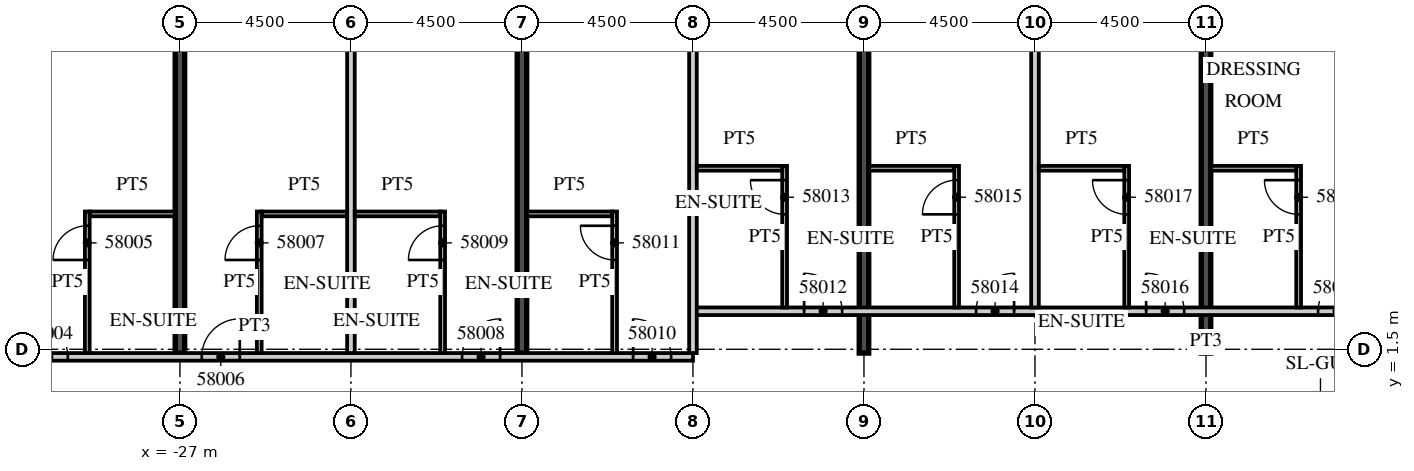
"""IFC4 building model, lengths in metres.
Left out: names, types, materials, properties, quantities, classifications, styles, units other than length and angle.
Written with IfcOpenShell. Run it as: python <this file> out.ifc"""

import sys

from ifc_helpers import new_model, si_unit, direction, frame, frame_2d, origin, place, context, subcontext, project, spatial, rectangle, extrude, element, fill, save


model = new_model("IFC4")
c1 = context("Model", 3, precision=1e-05, world=origin(), true_north=direction((0.0, 1.0)))
c2 = subcontext(c1, "Body", "Model", "MODEL_VIEW")
j1 = project(units=[si_unit("LENGTHUNIT", "METRE"), si_unit("PLANEANGLEUNIT", "RADIAN")], contexts=[c1])
p1 = place(None, origin())
s1 = spatial("IfcSite", under=j1, at=p1, CompositionType="ELEMENT")
p2 = place(p1, origin())
s2 = spatial("IfcBuilding", under=s1, at=p2, CompositionType="ELEMENT")
p3 = place(p2, frame((0.0, 0.0, 237.5)))
s3 = spatial("IfcBuildingStorey", under=s2, at=p3, CompositionType="ELEMENT", Elevation=237.5)
p4 = place(p3, frame((-27.0, 1.4, 0.0), z_axis=(0.0, 0.0, 1.0), x_axis=(0.0, 1.0, 0.0)))
e1 = element("IfcWall", 1, at=p4, inside=s3, PredefinedType="SHEAR", context=c2, shape_type="SweptSolid", body=[
    extrude(rectangle(XDim=18.817, YDim=0.25, at=frame_2d((9.409, 0.0))), origin(), (0.0, 0.0, 1.0), 3.3),
])
p5 = place(p3, frame((-18.0, 1.4, 0.0), z_axis=(0.0, 0.0, 1.0), x_axis=(0.0, 1.0, 0.0)))
e2 = element("IfcWall", 2, at=p5, inside=s3, PredefinedType="SHEAR", context=c2, shape_type="SweptSolid", body=[
    extrude(rectangle(XDim=18.974, YDim=0.25, at=frame_2d((9.487, 0.0))), origin(), (0.0, 0.0, 1.0), 3.3),
])
p6 = place(p3, frame((-9.0, 1.4, 0.0), z_axis=(0.0, 0.0, 1.0), x_axis=(0.0, 1.0, 0.0)))
e3 = element("IfcWall", 3, at=p6, inside=s3, PredefinedType="SHEAR", context=c2, shape_type="SweptSolid", body=[
    extrude(rectangle(XDim=19.132, YDim=0.25, at=frame_2d((9.566, 0.0))), origin(), (0.0, 0.0, 1.0), 3.3),
])
p7 = place(p3, frame((0.0, 1.4, 0.0), z_axis=(0.0, 0.0, 1.0), x_axis=(0.0, 1.0, 0.0)))
e4 = element("IfcWall", 4, at=p7, inside=s3, PredefinedType="SHEAR", context=c2, shape_type="SweptSolid", body=[
    extrude(rectangle(XDim=19.289, YDim=0.25, at=frame_2d((9.644, 0.0))), origin(), (0.0, 0.0, 1.0), 3.3),
])
p8 = place(p3, frame((-36.566, 1.3, 0.0), z_axis=(0.0, 0.0, 1.0), x_axis=(1.0, 0.0, 0.0)))
e5 = element("IfcWall", 5, at=p8, inside=s3, PredefinedType="PARTITIONING", context=c2, shape_type="SweptSolid", body=[
    extrude(rectangle(XDim=23.066, YDim=0.2, at=frame_2d((11.533, 0.0))), origin(), (0.0, 0.0, 1.0), 3.02),
])
p9 = place(p8, frame((1.141, 0.0, 0.0)))
e6 = element("IfcOpeningElement", 6, at=p9, cuts=e5, PredefinedType="OPENING", context=c2, shape_type="SweptSolid", body=[
    extrude(rectangle(XDim=1.0, YDim=2.1, at=frame_2d((0.5, 1.05))), frame((0.0, 0.11, 0.0), z_axis=(0.0, -1.0, 0.0), x_axis=(1.0, 0.0, 0.0)), (0.0, 0.0, 1.0), 0.22),
])
p10 = place(p8, frame((5.616, 0.0, 0.0)))
e7 = element("IfcOpeningElement", 7, at=p10, cuts=e5, PredefinedType="OPENING", context=c2, shape_type="SweptSolid", body=[
    extrude(rectangle(XDim=1.0, YDim=2.1, at=frame_2d((0.5, 1.05))), frame((0.0, 0.11, 0.0), z_axis=(0.0, -1.0, 0.0), x_axis=(1.0, 0.0, 0.0)), (0.0, 0.0, 1.0), 0.22),
])
p11 = place(p8, frame((10.141, 0.0, 0.0)))
e8 = element("IfcOpeningElement", 8, at=p11, cuts=e5, PredefinedType="OPENING", context=c2, shape_type="SweptSolid", body=[
    extrude(rectangle(XDim=1.0, YDim=2.1, at=frame_2d((0.5, 1.05))), frame((0.0, 0.11, 0.0), z_axis=(0.0, -1.0, 0.0), x_axis=(1.0, 0.0, 0.0)), (0.0, 0.0, 1.0), 0.22),
])
p12 = place(p8, frame((16.991, 0.0, 0.0)))
e9 = element("IfcOpeningElement", 9, at=p12, cuts=e5, PredefinedType="OPENING", context=c2, shape_type="SweptSolid", body=[
    extrude(rectangle(XDim=1.0, YDim=2.1, at=frame_2d((0.5, 1.05))), frame((0.0, 0.11, 0.0), z_axis=(0.0, -1.0, 0.0), x_axis=(1.0, 0.0, 0.0)), (0.0, 0.0, 1.0), 0.22),
])
p13 = place(p8, frame((21.491, 0.0, 0.0)))
e10 = element("IfcOpeningElement", 10, at=p13, cuts=e5, PredefinedType="OPENING", context=c2, shape_type="SweptSolid", body=[
    extrude(rectangle(XDim=1.0, YDim=2.1, at=frame_2d((0.5, 1.05))), frame((0.0, 0.11, 0.0), z_axis=(0.0, -1.0, 0.0), x_axis=(1.0, 0.0, 0.0)), (0.0, 0.0, 1.0), 0.22),
])
p14 = place(p3, frame((-13.5, 2.5, 0.0), z_axis=(0.0, 0.0, 1.0), x_axis=(1.0, 0.0, 0.0)))
e11 = element("IfcWall", 11, at=p14, inside=s3, PredefinedType="PARTITIONING", context=c2, shape_type="SweptSolid", body=[
    extrude(rectangle(XDim=27.0, YDim=0.2, at=frame_2d((13.5, 0.0))), origin(), (0.0, 0.0, 1.0), 3.02),
])
p15 = place(p14, frame((2.925, 0.0, 0.0)))
e12 = element("IfcOpeningElement", 12, at=p15, cuts=e11, PredefinedType="OPENING", context=c2, shape_type="SweptSolid", body=[
    extrude(rectangle(XDim=1.0, YDim=2.1, at=frame_2d((0.5, 1.05))), frame((0.0, 0.11, 0.0), z_axis=(0.0, -1.0, 0.0), x_axis=(1.0, 0.0, 0.0)), (0.0, 0.0, 1.0), 0.22),
])
p16 = place(p14, frame((7.45, 0.0, 0.0)))
e13 = element("IfcOpeningElement", 13, at=p16, cuts=e11, PredefinedType="OPENING", context=c2, shape_type="SweptSolid", body=[
    extrude(rectangle(XDim=1.0, YDim=2.1, at=frame_2d((0.5, 1.05))), frame((0.0, 0.11, 0.0), z_axis=(0.0, -1.0, 0.0), x_axis=(1.0, 0.0, 0.0)), (0.0, 0.0, 1.0), 0.22),
])
p17 = place(p14, frame((11.925, 0.0, 0.0)))
e14 = element("IfcOpeningElement", 14, at=p17, cuts=e11, PredefinedType="OPENING", context=c2, shape_type="SweptSolid", body=[
    extrude(rectangle(XDim=1.0, YDim=2.1, at=frame_2d((0.5, 1.05))), frame((0.0, 0.11, 0.0), z_axis=(0.0, -1.0, 0.0), x_axis=(1.0, 0.0, 0.0)), (0.0, 0.0, 1.0), 0.22),
])
p18 = place(p14, frame((16.45, 0.0, 0.0)))
e15 = element("IfcOpeningElement", 15, at=p18, cuts=e11, PredefinedType="OPENING", context=c2, shape_type="SweptSolid", body=[
    extrude(rectangle(XDim=1.0, YDim=2.1, at=frame_2d((0.5, 1.05))), frame((0.0, 0.11, 0.0), z_axis=(0.0, -1.0, 0.0), x_axis=(1.0, 0.0, 0.0)), (0.0, 0.0, 1.0), 0.22),
])
p19 = place(p14, frame((18.55, 0.0, 0.0)))
e16 = element("IfcOpeningElement", 16, at=p19, cuts=e11, PredefinedType="OPENING", context=c2, shape_type="SweptSolid", body=[
    extrude(rectangle(XDim=1.0, YDim=2.1, at=frame_2d((0.5, 1.05))), frame((0.0, 0.11, 0.0), z_axis=(0.0, -1.0, 0.0), x_axis=(1.0, 0.0, 0.0)), (0.0, 0.0, 1.0), 0.22),
])
p20 = place(p14, frame((23.075, 0.0, 0.0)))
e17 = element("IfcOpeningElement", 17, at=p20, cuts=e11, PredefinedType="OPENING", context=c2, shape_type="SweptSolid", body=[
    extrude(rectangle(XDim=1.0, YDim=2.1, at=frame_2d((0.5, 1.05))), frame((0.0, 0.11, 0.0), z_axis=(0.0, -1.0, 0.0), x_axis=(1.0, 0.0, 0.0)), (0.0, 0.0, 1.0), 0.22),
])
p21 = place(p3, frame((-29.438, 1.4, 0.0), z_axis=(0.0, 0.0, 1.0), x_axis=(0.0, 1.0, 0.0)))
e18 = element("IfcWall", 18, at=p21, inside=s3, PredefinedType="PARTITIONING", context=c2, shape_type="SweptSolid", body=[
    extrude(rectangle(XDim=3.725, YDim=0.125, at=frame_2d((1.863, 0.0))), origin(), (0.0, 0.0, 1.0), 3.02),
])
p22 = place(p21, frame((2.45, 0.0, 0.0)))
e19 = element("IfcOpeningElement", 19, at=p22, cuts=e18, PredefinedType="OPENING", context=c2, shape_type="SweptSolid", body=[
    extrude(rectangle(XDim=0.9, YDim=2.1, at=frame_2d((0.45, 1.05))), frame((0.0, 0.073, 0.0), z_axis=(0.0, -1.0, 0.0), x_axis=(1.0, 0.0, 0.0)), (0.0, 0.0, 1.0), 0.145),
])
p23 = place(p3, frame((-29.375, 5.062, 0.0), z_axis=(0.0, 0.0, 1.0), x_axis=(1.0, 0.0, 0.0)))
e20 = element("IfcWall", 20, at=p23, inside=s3, PredefinedType="PARTITIONING", context=c2, shape_type="SweptSolid", body=[
    extrude(rectangle(XDim=2.25, YDim=0.125, at=frame_2d((1.125, 0.0))), origin(), (0.0, 0.0, 1.0), 3.02),
])
p24 = place(p3, frame((-22.5, 1.4, 0.0), z_axis=(0.0, 0.0, 1.0), x_axis=(0.0, 1.0, 0.0)))
e21 = element("IfcWall", 21, at=p24, inside=s3, PredefinedType="PARTITIONING", context=c2, shape_type="SweptSolid", body=[
    extrude(rectangle(XDim=18.908, YDim=0.2, at=frame_2d((9.454, 0.0))), origin(), (0.0, 0.0, 1.0), 3.02),
])
p25 = place(p3, frame((-24.913, 1.4, 0.0), z_axis=(0.0, 0.0, 1.0), x_axis=(0.0, 1.0, 0.0)))
e22 = element("IfcWall", 22, at=p25, inside=s3, PredefinedType="PARTITIONING", context=c2, shape_type="SweptSolid", body=[
    extrude(rectangle(XDim=3.725, YDim=0.125, at=frame_2d((1.863, 0.0))), origin(), (0.0, 0.0, 1.0), 3.02),
])
p26 = place(p25, frame((2.45, 0.0, 0.0)))
e23 = element("IfcOpeningElement", 23, at=p26, cuts=e22, PredefinedType="OPENING", context=c2, shape_type="SweptSolid", body=[
    extrude(rectangle(XDim=0.9, YDim=2.1, at=frame_2d((0.45, 1.05))), frame((0.0, 0.073, 0.0), z_axis=(0.0, -1.0, 0.0), x_axis=(1.0, 0.0, 0.0)), (0.0, 0.0, 1.0), 0.145),
])
p27 = place(p3, frame((-24.85, 5.062, 0.0), z_axis=(0.0, 0.0, 1.0), x_axis=(1.0, 0.0, 0.0)))
e24 = element("IfcWall", 24, at=p27, inside=s3, PredefinedType="PARTITIONING", context=c2, shape_type="SweptSolid", body=[
    extrude(rectangle(XDim=2.25, YDim=0.125, at=frame_2d((1.125, 0.0))), origin(), (0.0, 0.0, 1.0), 3.02),
])
p28 = place(p3, frame((-20.087, 1.4, 0.0), z_axis=(0.0, 0.0, 1.0), x_axis=(0.0, 1.0, 0.0)))
e25 = element("IfcWall", 25, at=p28, inside=s3, PredefinedType="PARTITIONING", context=c2, shape_type="SweptSolid", body=[
    extrude(rectangle(XDim=3.725, YDim=0.125, at=frame_2d((1.863, 0.0))), origin(), (0.0, 0.0, 1.0), 3.02),
])
p29 = place(p28, frame((2.45, 0.0, 0.0)))
e26 = element("IfcOpeningElement", 26, at=p29, cuts=e25, PredefinedType="OPENING", context=c2, shape_type="SweptSolid", body=[
    extrude(rectangle(XDim=0.9, YDim=2.1, at=frame_2d((0.45, 1.05))), frame((0.0, 0.073, 0.0), z_axis=(0.0, -1.0, 0.0), x_axis=(1.0, 0.0, 0.0)), (0.0, 0.0, 1.0), 0.145),
])
p30 = place(p3, frame((-22.4, 5.062, 0.0), z_axis=(0.0, 0.0, 1.0), x_axis=(1.0, 0.0, 0.0)))
e27 = element("IfcWall", 27, at=p30, inside=s3, PredefinedType="PARTITIONING", context=c2, shape_type="SweptSolid", body=[
    extrude(rectangle(XDim=2.25, YDim=0.125, at=frame_2d((1.125, 0.0))), origin(), (0.0, 0.0, 1.0), 3.02),
])
p31 = place(p3, frame((-13.5, 1.4, 0.0), z_axis=(0.0, 0.0, 1.0), x_axis=(0.0, 1.0, 0.0)))
e28 = element("IfcWall", 28, at=p31, inside=s3, PredefinedType="PARTITIONING", context=c2, shape_type="SweptSolid", body=[
    extrude(rectangle(XDim=19.065, YDim=0.2, at=frame_2d((9.533, 0.0))), origin(), (0.0, 0.0, 1.0), 3.02),
])
p32 = place(p3, frame((-15.562, 1.4, 0.0), z_axis=(0.0, 0.0, 1.0), x_axis=(0.0, 1.0, 0.0)))
e29 = element("IfcWall", 29, at=p32, inside=s3, PredefinedType="PARTITIONING", context=c2, shape_type="SweptSolid", body=[
    extrude(rectangle(XDim=3.725, YDim=0.125, at=frame_2d((1.863, 0.0))), origin(), (0.0, 0.0, 1.0), 3.02),
])
p33 = place(p32, frame((2.45, 0.0, 0.0)))
e30 = element("IfcOpeningElement", 30, at=p33, cuts=e29, PredefinedType="OPENING", context=c2, shape_type="SweptSolid", body=[
    extrude(rectangle(XDim=0.9, YDim=2.1, at=frame_2d((0.45, 1.05))), frame((0.0, 0.073, 0.0), z_axis=(0.0, -1.0, 0.0), x_axis=(1.0, 0.0, 0.0)), (0.0, 0.0, 1.0), 0.145),
])
p34 = place(p3, frame((-17.875, 5.062, 0.0), z_axis=(0.0, 0.0, 1.0), x_axis=(1.0, 0.0, 0.0)))
e31 = element("IfcWall", 31, at=p34, inside=s3, PredefinedType="PARTITIONING", context=c2, shape_type="SweptSolid", body=[
    extrude(rectangle(XDim=2.25, YDim=0.125, at=frame_2d((1.125, 0.0))), origin(), (0.0, 0.0, 1.0), 3.02),
])
p35 = place(p3, frame((-11.088, 2.6, 0.0), z_axis=(0.0, 0.0, 1.0), x_axis=(0.0, 1.0, 0.0)))
e32 = element("IfcWall", 32, at=p35, inside=s3, PredefinedType="PARTITIONING", context=c2, shape_type="SweptSolid", body=[
    extrude(rectangle(XDim=3.725, YDim=0.125, at=frame_2d((1.862, 0.0))), origin(), (0.0, 0.0, 1.0), 3.02),
])
p36 = place(p35, frame((2.45, 0.0, 0.0)))
e33 = element("IfcOpeningElement", 33, at=p36, cuts=e32, PredefinedType="OPENING", context=c2, shape_type="SweptSolid", body=[
    extrude(rectangle(XDim=0.9, YDim=2.1, at=frame_2d((0.45, 1.05))), frame((0.0, 0.073, 0.0), z_axis=(0.0, -1.0, 0.0), x_axis=(1.0, 0.0, 0.0)), (0.0, 0.0, 1.0), 0.145),
])
p37 = place(p3, frame((-13.4, 6.263, 0.0), z_axis=(0.0, 0.0, 1.0), x_axis=(1.0, 0.0, 0.0)))
e34 = element("IfcWall", 34, at=p37, inside=s3, PredefinedType="PARTITIONING", context=c2, shape_type="SweptSolid", body=[
    extrude(rectangle(XDim=2.25, YDim=0.125, at=frame_2d((1.125, 0.0))), origin(), (0.0, 0.0, 1.0), 3.02),
])
p38 = place(p3, frame((-4.5, 2.6, 0.0), z_axis=(0.0, 0.0, 1.0), x_axis=(0.0, 1.0, 0.0)))
e35 = element("IfcWall", 35, at=p38, inside=s3, PredefinedType="PARTITIONING", context=c2, shape_type="SweptSolid", body=[
    extrude(rectangle(XDim=18.022, YDim=0.2, at=frame_2d((9.011, 0.0))), origin(), (0.0, 0.0, 1.0), 3.02),
])
p39 = place(p3, frame((-6.562, 2.6, 0.0), z_axis=(0.0, 0.0, 1.0), x_axis=(0.0, 1.0, 0.0)))
e36 = element("IfcWall", 36, at=p39, inside=s3, PredefinedType="PARTITIONING", context=c2, shape_type="SweptSolid", body=[
    extrude(rectangle(XDim=3.725, YDim=0.125, at=frame_2d((1.862, 0.0))), origin(), (0.0, 0.0, 1.0), 3.02),
])
p40 = place(p39, frame((2.45, 0.0, 0.0)))
e37 = element("IfcOpeningElement", 37, at=p40, cuts=e36, PredefinedType="OPENING", context=c2, shape_type="SweptSolid", body=[
    extrude(rectangle(XDim=0.9, YDim=2.1, at=frame_2d((0.45, 1.05))), frame((0.0, 0.073, 0.0), z_axis=(0.0, -1.0, 0.0), x_axis=(1.0, 0.0, 0.0)), (0.0, 0.0, 1.0), 0.145),
])
p41 = place(p3, frame((-8.875, 6.263, 0.0), z_axis=(0.0, 0.0, 1.0), x_axis=(1.0, 0.0, 0.0)))
e38 = element("IfcWall", 38, at=p41, inside=s3, PredefinedType="PARTITIONING", context=c2, shape_type="SweptSolid", body=[
    extrude(rectangle(XDim=2.25, YDim=0.125, at=frame_2d((1.125, 0.0))), origin(), (0.0, 0.0, 1.0), 3.02),
])
p42 = place(p3, frame((-2.087, 2.6, 0.0), z_axis=(0.0, 0.0, 1.0), x_axis=(0.0, 1.0, 0.0)))
e39 = element("IfcWall", 39, at=p42, inside=s3, PredefinedType="PARTITIONING", context=c2, shape_type="SweptSolid", body=[
    extrude(rectangle(XDim=3.725, YDim=0.125, at=frame_2d((1.862, 0.0))), origin(), (0.0, 0.0, 1.0), 3.02),
])
p43 = place(p42, frame((2.45, 0.0, 0.0)))
e40 = element("IfcOpeningElement", 40, at=p43, cuts=e39, PredefinedType="OPENING", context=c2, shape_type="SweptSolid", body=[
    extrude(rectangle(XDim=0.9, YDim=2.1, at=frame_2d((0.45, 1.05))), frame((0.0, 0.073, 0.0), z_axis=(0.0, -1.0, 0.0), x_axis=(1.0, 0.0, 0.0)), (0.0, 0.0, 1.0), 0.145),
])
p44 = place(p3, frame((-4.4, 6.263, 0.0), z_axis=(0.0, 0.0, 1.0), x_axis=(1.0, 0.0, 0.0)))
e41 = element("IfcWall", 41, at=p44, inside=s3, PredefinedType="PARTITIONING", context=c2, shape_type="SweptSolid", body=[
    extrude(rectangle(XDim=2.25, YDim=0.125, at=frame_2d((1.125, 0.0))), origin(), (0.0, 0.0, 1.0), 3.02),
])
p45 = place(p3, frame((2.438, 2.6, 0.0), z_axis=(0.0, 0.0, 1.0), x_axis=(0.0, 1.0, 0.0)))
e42 = element("IfcWall", 42, at=p45, inside=s3, PredefinedType="PARTITIONING", context=c2, shape_type="SweptSolid", body=[
    extrude(rectangle(XDim=3.725, YDim=0.125, at=frame_2d((1.862, 0.0))), origin(), (0.0, 0.0, 1.0), 3.02),
])
p46 = place(p45, frame((2.45, 0.0, 0.0)))
e43 = element("IfcOpeningElement", 43, at=p46, cuts=e42, PredefinedType="OPENING", context=c2, shape_type="SweptSolid", body=[
    extrude(rectangle(XDim=0.9, YDim=2.1, at=frame_2d((0.45, 1.05))), frame((0.0, 0.073, 0.0), z_axis=(0.0, -1.0, 0.0), x_axis=(1.0, 0.0, 0.0)), (0.0, 0.0, 1.0), 0.145),
])
p47 = place(p3, frame((0.125, 6.263, 0.0), z_axis=(0.0, 0.0, 1.0), x_axis=(1.0, 0.0, 0.0)))
e44 = element("IfcWall", 44, at=p47, inside=s3, PredefinedType="PARTITIONING", context=c2, shape_type="SweptSolid", body=[
    extrude(rectangle(XDim=2.25, YDim=0.125, at=frame_2d((1.125, 0.0))), origin(), (0.0, 0.0, 1.0), 3.02),
])
p48 = place(p10, origin())
e45 = element("IfcDoor", 45, at=p48, inside=s3, OperationType="SINGLE_SWING_LEFT", PredefinedType="DOOR", context=c2, shape_type="SweptSolid", body=[
    extrude(rectangle(XDim=1.0, YDim=2.1, at=frame_2d((0.5, 1.05))), frame((0.0, 0.025, 0.0), z_axis=(0.0, -1.0, 0.0), x_axis=(1.0, 0.0, 0.0)), (0.0, 0.0, 1.0), 0.05),
])
fill(e7, e45)
p49 = place(p22, origin())
e46 = element("IfcDoor", 46, at=p49, inside=s3, OperationType="SINGLE_SWING_LEFT", PredefinedType="DOOR", context=c2, shape_type="SweptSolid", body=[
    extrude(rectangle(XDim=0.9, YDim=2.1, at=frame_2d((0.45, 1.05))), frame((0.0, 0.025, 0.0), z_axis=(0.0, -1.0, 0.0), x_axis=(1.0, 0.0, 0.0)), (0.0, 0.0, 1.0), 0.05),
])
fill(e19, e46)
p50 = place(p11, origin())
e47 = element("IfcDoor", 47, at=p50, inside=s3, OperationType="SINGLE_SWING_RIGHT", PredefinedType="DOOR", context=c2, shape_type="SweptSolid", body=[
    extrude(rectangle(XDim=1.0, YDim=2.1, at=frame_2d((0.5, 1.05))), frame((0.0, 0.025, 0.0), z_axis=(0.0, -1.0, 0.0), x_axis=(1.0, 0.0, 0.0)), (0.0, 0.0, 1.0), 0.05),
])
fill(e8, e47)
p51 = place(p26, origin())
e48 = element("IfcDoor", 48, at=p51, inside=s3, OperationType="SINGLE_SWING_LEFT", PredefinedType="DOOR", context=c2, shape_type="SweptSolid", body=[
    extrude(rectangle(XDim=0.9, YDim=2.1, at=frame_2d((0.45, 1.05))), frame((0.0, 0.025, 0.0), z_axis=(0.0, -1.0, 0.0), x_axis=(1.0, 0.0, 0.0)), (0.0, 0.0, 1.0), 0.05),
])
fill(e23, e48)
p52 = place(p12, origin())
e49 = element("IfcDoor", 49, at=p52, inside=s3, OperationType="SINGLE_SWING_RIGHT", PredefinedType="DOOR", context=c2, shape_type="SweptSolid", body=[
    extrude(rectangle(XDim=1.0, YDim=2.1, at=frame_2d((0.5, 1.05))), frame((0.0, 0.025, 0.0), z_axis=(0.0, -1.0, 0.0), x_axis=(1.0, 0.0, 0.0)), (0.0, 0.0, 1.0), 0.05),
])
fill(e9, e49)
p53 = place(p29, origin())
e50 = element("IfcDoor", 50, at=p53, inside=s3, OperationType="SINGLE_SWING_LEFT", PredefinedType="DOOR", context=c2, shape_type="SweptSolid", body=[
    extrude(rectangle(XDim=0.9, YDim=2.1, at=frame_2d((0.45, 1.05))), frame((0.0, 0.025, 0.0), z_axis=(0.0, -1.0, 0.0), x_axis=(1.0, 0.0, 0.0)), (0.0, 0.0, 1.0), 0.05),
])
fill(e26, e50)
p54 = place(p13, origin())
e51 = element("IfcDoor", 51, at=p54, inside=s3, OperationType="SINGLE_SWING_LEFT", PredefinedType="DOOR", context=c2, shape_type="SweptSolid", body=[
    extrude(rectangle(XDim=1.0, YDim=2.1, at=frame_2d((0.5, 1.05))), frame((0.0, 0.025, 0.0), z_axis=(0.0, -1.0, 0.0), x_axis=(1.0, 0.0, 0.0)), (0.0, 0.0, 1.0), 0.05),
])
fill(e10, e51)
p55 = place(p33, origin())
e52 = element("IfcDoor", 52, at=p55, inside=s3, OperationType="SINGLE_SWING_RIGHT", PredefinedType="DOOR", context=c2, shape_type="SweptSolid", body=[
    extrude(rectangle(XDim=0.9, YDim=2.1, at=frame_2d((0.45, 1.05))), frame((0.0, 0.025, 0.0), z_axis=(0.0, -1.0, 0.0), x_axis=(1.0, 0.0, 0.0)), (0.0, 0.0, 1.0), 0.05),
])
fill(e30, e52)
p56 = place(p15, origin())
e53 = element("IfcDoor", 53, at=p56, inside=s3, OperationType="SINGLE_SWING_LEFT", PredefinedType="DOOR", context=c2, shape_type="SweptSolid", body=[
    extrude(rectangle(XDim=1.0, YDim=2.1, at=frame_2d((0.5, 1.05))), frame((0.0, 0.025, 0.0), z_axis=(0.0, -1.0, 0.0), x_axis=(1.0, 0.0, 0.0)), (0.0, 0.0, 1.0), 0.05),
])
fill(e12, e53)
p57 = place(p36, origin())
e54 = element("IfcDoor", 54, at=p57, inside=s3, OperationType="SINGLE_SWING_RIGHT", PredefinedType="DOOR", context=c2, shape_type="SweptSolid", body=[
    extrude(rectangle(XDim=0.9, YDim=2.1, at=frame_2d((0.45, 1.05))), frame((0.0, 0.025, 0.0), z_axis=(0.0, -1.0, 0.0), x_axis=(1.0, 0.0, 0.0)), (0.0, 0.0, 1.0), 0.05),
])
fill(e33, e54)
p58 = place(p16, origin())
e55 = element("IfcDoor", 55, at=p58, inside=s3, OperationType="SINGLE_SWING_RIGHT", PredefinedType="DOOR", context=c2, shape_type="SweptSolid", body=[
    extrude(rectangle(XDim=1.0, YDim=2.1, at=frame_2d((0.5, 1.05))), frame((0.0, 0.025, 0.0), z_axis=(0.0, -1.0, 0.0), x_axis=(1.0, 0.0, 0.0)), (0.0, 0.0, 1.0), 0.05),
])
fill(e13, e55)
p59 = place(p40, origin())
e56 = element("IfcDoor", 56, at=p59, inside=s3, OperationType="SINGLE_SWING_LEFT", PredefinedType="DOOR", context=c2, shape_type="SweptSolid", body=[
    extrude(rectangle(XDim=0.9, YDim=2.1, at=frame_2d((0.45, 1.05))), frame((0.0, 0.025, 0.0), z_axis=(0.0, -1.0, 0.0), x_axis=(1.0, 0.0, 0.0)), (0.0, 0.0, 1.0), 0.05),
])
fill(e37, e56)
p60 = place(p17, origin())
e57 = element("IfcDoor", 57, at=p60, inside=s3, OperationType="SINGLE_SWING_LEFT", PredefinedType="DOOR", context=c2, shape_type="SweptSolid", body=[
    extrude(rectangle(XDim=1.0, YDim=2.1, at=frame_2d((0.5, 1.05))), frame((0.0, 0.025, 0.0), z_axis=(0.0, -1.0, 0.0), x_axis=(1.0, 0.0, 0.0)), (0.0, 0.0, 1.0), 0.05),
])
fill(e14, e57)
p61 = place(p43, origin())
e58 = element("IfcDoor", 58, at=p61, inside=s3, OperationType="SINGLE_SWING_RIGHT", PredefinedType="DOOR", context=c2, shape_type="SweptSolid", body=[
    extrude(rectangle(XDim=0.9, YDim=2.1, at=frame_2d((0.45, 1.05))), frame((0.0, 0.025, 0.0), z_axis=(0.0, -1.0, 0.0), x_axis=(1.0, 0.0, 0.0)), (0.0, 0.0, 1.0), 0.05),
])
fill(e40, e58)
p62 = place(p18, origin())
e59 = element("IfcDoor", 59, at=p62, inside=s3, OperationType="SINGLE_SWING_RIGHT", PredefinedType="DOOR", context=c2, shape_type="SweptSolid", body=[
    extrude(rectangle(XDim=1.0, YDim=2.1, at=frame_2d((0.5, 1.05))), frame((0.0, 0.025, 0.0), z_axis=(0.0, -1.0, 0.0), x_axis=(1.0, 0.0, 0.0)), (0.0, 0.0, 1.0), 0.05),
])
fill(e15, e59)
p63 = place(p46, origin())
e60 = element("IfcDoor", 60, at=p63, inside=s3, OperationType="SINGLE_SWING_RIGHT", PredefinedType="DOOR", context=c2, shape_type="SweptSolid", body=[
    extrude(rectangle(XDim=0.9, YDim=2.1, at=frame_2d((0.45, 1.05))), frame((0.0, 0.025, 0.0), z_axis=(0.0, -1.0, 0.0), x_axis=(1.0, 0.0, 0.0)), (0.0, 0.0, 1.0), 0.05),
])
fill(e43, e60)
save(model, sys.argv[1])
